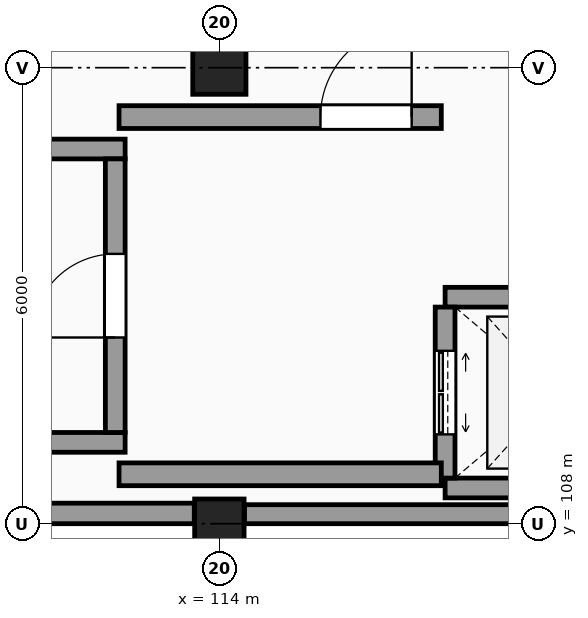
"""IFC4 building model, lengths in metres.
Left out: names, types, materials, properties, quantities, classifications, styles, units other than length and angle.
Written with IfcOpenShell. Run it as: python <this file> out.ifc"""

import sys

from ifc_helpers import new_model, si_unit, direction, frame, frame_2d, origin, origin_2d, place, context, subcontext, project, spatial, rectangle, circle, extrude, element, fill, save


model = new_model("IFC4")
c1 = context("Model", 3, precision=1e-05, world=origin(), true_north=direction((0.0, 1.0)))
c2 = subcontext(c1, "Body", "Model", "MODEL_VIEW")
j1 = project(units=[si_unit("LENGTHUNIT", "METRE"), si_unit("PLANEANGLEUNIT", "RADIAN")], contexts=[c1])
p1 = place(None, origin())
s1 = spatial("IfcSite", under=j1, at=p1, CompositionType="ELEMENT")
p2 = place(p1, origin())
s2 = spatial("IfcBuilding", under=s1, at=p2, CompositionType="ELEMENT")
p3 = place(p2, frame((0.0, 0.0, 10.5)))
s3 = spatial("IfcBuildingStorey", under=s2, at=p3, CompositionType="ELEMENT", Elevation=10.5)
p4 = place(p3, frame((114.0, 108.0, 0.0), z_axis=(0.0, 0.0, 1.0), x_axis=(1.0, 0.0, 0.0)))
e1 = element("IfcColumn", 1, at=p4, inside=s3, PredefinedType="COLUMN", context=c2, shape_type="SweptSolid", body=[
    extrude(rectangle(XDim=0.65, YDim=0.65, at=origin_2d()), origin(), (0.0, 0.0, 1.0), 4.5),
])
p5 = place(p3, frame((114.0, 114.0, 0.0), z_axis=(0.0, 0.0, 1.0), x_axis=(1.0, 0.0, 0.0)))
e2 = element("IfcColumn", 2, at=p5, inside=s3, PredefinedType="COLUMN", context=c2, shape_type="SweptSolid", body=[
    extrude(circle(Radius=0.35, at=origin_2d()), origin(), (0.0, 0.0, 1.0), 4.5),
])
p6 = place(p3, frame((108.355, 108.135, 0.0), z_axis=(0.0, 0.0, 1.0), x_axis=(1.0, 0.0, 0.0)))
e3 = element("IfcWall", 3, at=p6, inside=s3, PredefinedType="SOLIDWALL", context=c2, shape_type="SweptSolid", body=[
    extrude(rectangle(XDim=5.315, YDim=0.27, at=frame_2d((2.657, 0.0))), origin(), (0.0, 0.0, 1.0), 3.49),
])
p7 = place(p3, frame((114.33, 108.125, 0.0), z_axis=(0.0, 0.0, 1.0), x_axis=(1.0, 0.0, 0.0)))
e4 = element("IfcWall", 4, at=p7, inside=s3, PredefinedType="SOLIDWALL", context=c2, shape_type="SweptSolid", body=[
    extrude(rectangle(XDim=5.315, YDim=0.25, at=frame_2d((2.657, 0.0))), origin(), (0.0, 0.0, 1.0), 3.49),
])
for number, where, z_axis, x_axis in (
    (5, (102.04, 109.07, 0.0), (0.0, 0.0, 1.0), (1.0, 0.0, 0.0)),
    (6, (102.04, 112.93, 0.0), (0.0, 0.0, 1.0), (1.0, 0.0, 0.0)),
):
    element("IfcWall", number, at=place(p3, frame(where, z_axis=z_axis, x_axis=x_axis)), inside=s3, PredefinedType="SHEAR", context=c2, shape_type="SweptSolid", body=[
        extrude(rectangle(XDim=10.72, YDim=0.26, at=frame_2d((5.36, 0.0))), origin(), (0.0, 0.0, 1.0), 4.5),
    ])
p8 = place(p3, frame((112.63, 109.2, 0.0), z_axis=(0.0, 0.0, 1.0), x_axis=(0.0, 1.0, 0.0)))
e7 = element("IfcWall", 7, at=p8, inside=s3, PredefinedType="SHEAR", context=c2, shape_type="SweptSolid", body=[
    extrude(rectangle(XDim=3.6, YDim=0.26, at=frame_2d((1.8, 0.0))), origin(), (0.0, 0.0, 1.0), 4.5),
])
p9 = place(p8, frame((1.25, 0.0, 0.0)))
e8 = element("IfcOpeningElement", 8, at=p9, cuts=e7, PredefinedType="OPENING", context=c2, shape_type="SweptSolid", body=[
    extrude(rectangle(XDim=1.1, YDim=2.15, at=frame_2d((0.55, 1.075))), frame((0.0, 0.14, 0.0), z_axis=(0.0, -1.0, 0.0), x_axis=(1.0, 0.0, 0.0)), (0.0, 0.0, 1.0), 0.28),
])
for number, where, z_axis, x_axis in (
    (9, (116.97, 108.47, 0.0), (0.0, 0.0, 1.0), (1.0, 0.0, 0.0)),
    (10, (116.97, 110.98, 0.0), (0.0, 0.0, 1.0), (1.0, 0.0, 0.0)),
):
    element("IfcWall", number, at=place(p3, frame(where, z_axis=z_axis, x_axis=x_axis)), inside=s3, PredefinedType="SHEAR", context=c2, shape_type="SweptSolid", body=[
        extrude(rectangle(XDim=2.91, YDim=0.26, at=frame_2d((1.455, 0.0))), origin(), (0.0, 0.0, 1.0), 4.5),
    ])
p10 = place(p3, frame((116.97, 108.6, 0.0), z_axis=(0.0, 0.0, 1.0), x_axis=(0.0, 1.0, 0.0)))
e11 = element("IfcWall", 11, at=p10, inside=s3, PredefinedType="SHEAR", context=c2, shape_type="SweptSolid", body=[
    extrude(rectangle(XDim=2.25, YDim=0.26, at=frame_2d((1.125, 0.0))), origin(), (0.0, 0.0, 1.0), 4.5),
])
p11 = place(p10, frame((0.575, 0.0, 0.0)))
e12 = element("IfcOpeningElement", 12, at=p11, cuts=e11, PredefinedType="OPENING", context=c2, shape_type="SweptSolid", body=[
    extrude(rectangle(XDim=1.1, YDim=2.2, at=frame_2d((0.55, 1.1))), frame((0.0, 0.14, 0.0), z_axis=(0.0, -1.0, 0.0), x_axis=(1.0, 0.0, 0.0)), (0.0, 0.0, 1.0), 0.28),
])
p12 = place(p3, frame((112.68, 113.35, 0.0), z_axis=(0.0, 0.0, 1.0), x_axis=(1.0, 0.0, 0.0)))
e13 = element("IfcWall", 13, at=p12, inside=s3, PredefinedType="SHEAR", context=c2, shape_type="SweptSolid", body=[
    extrude(rectangle(XDim=4.24, YDim=0.3, at=frame_2d((2.12, 0.0))), origin(), (0.0, 0.0, 1.0), 4.5),
])
p13 = place(p12, frame((2.65, 0.0, 0.0)))
e14 = element("IfcOpeningElement", 14, at=p13, cuts=e13, PredefinedType="OPENING", context=c2, shape_type="SweptSolid", body=[
    extrude(rectangle(XDim=1.2, YDim=2.2, at=frame_2d((0.6, 1.1))), frame((0.0, 0.16, 0.0), z_axis=(0.0, -1.0, 0.0), x_axis=(1.0, 0.0, 0.0)), (0.0, 0.0, 1.0), 0.32),
])
p14 = place(p3, frame((112.68, 108.65, 0.0), z_axis=(0.0, 0.0, 1.0), x_axis=(1.0, 0.0, 0.0)))
e15 = element("IfcWall", 15, at=p14, inside=s3, PredefinedType="SHEAR", context=c2, shape_type="SweptSolid", body=[
    extrude(rectangle(XDim=4.24, YDim=0.3, at=frame_2d((2.12, 0.0))), origin(), (0.0, 0.0, 1.0), 4.5),
])
p15 = place(p9, origin())
e16 = element("IfcDoor", 16, at=p15, inside=s3, OperationType="SINGLE_SWING_LEFT", PredefinedType="DOOR", context=c2, shape_type="SweptSolid", body=[
    extrude(rectangle(XDim=1.1, YDim=2.15, at=frame_2d((0.55, 1.075))), frame((0.0, 0.025, 0.0), z_axis=(0.0, -1.0, 0.0), x_axis=(1.0, 0.0, 0.0)), (0.0, 0.0, 1.0), 0.05),
])
fill(e8, e16)
p16 = place(p11, origin())
e17 = element("IfcDoor", 17, at=p16, inside=s3, OperationType="DOUBLE_DOOR_SLIDING", PredefinedType="DOOR", context=c2, shape_type="SweptSolid", body=[
    extrude(rectangle(XDim=1.1, YDim=2.2, at=frame_2d((0.55, 1.1))), frame((0.0, 0.025, 0.0), z_axis=(0.0, -1.0, 0.0), x_axis=(1.0, 0.0, 0.0)), (0.0, 0.0, 1.0), 0.05),
])
fill(e12, e17)
p17 = place(p13, origin())
e18 = element("IfcDoor", 18, at=p17, inside=s3, OperationType="SINGLE_SWING_RIGHT", PredefinedType="DOOR", context=c2, shape_type="SweptSolid", body=[
    extrude(rectangle(XDim=1.2, YDim=2.2, at=frame_2d((0.6, 1.1))), frame((0.0, 0.025, 0.0), z_axis=(0.0, -1.0, 0.0), x_axis=(1.0, 0.0, 0.0)), (0.0, 0.0, 1.0), 0.05),
])
fill(e14, e18)
save(model, sys.argv[1])
